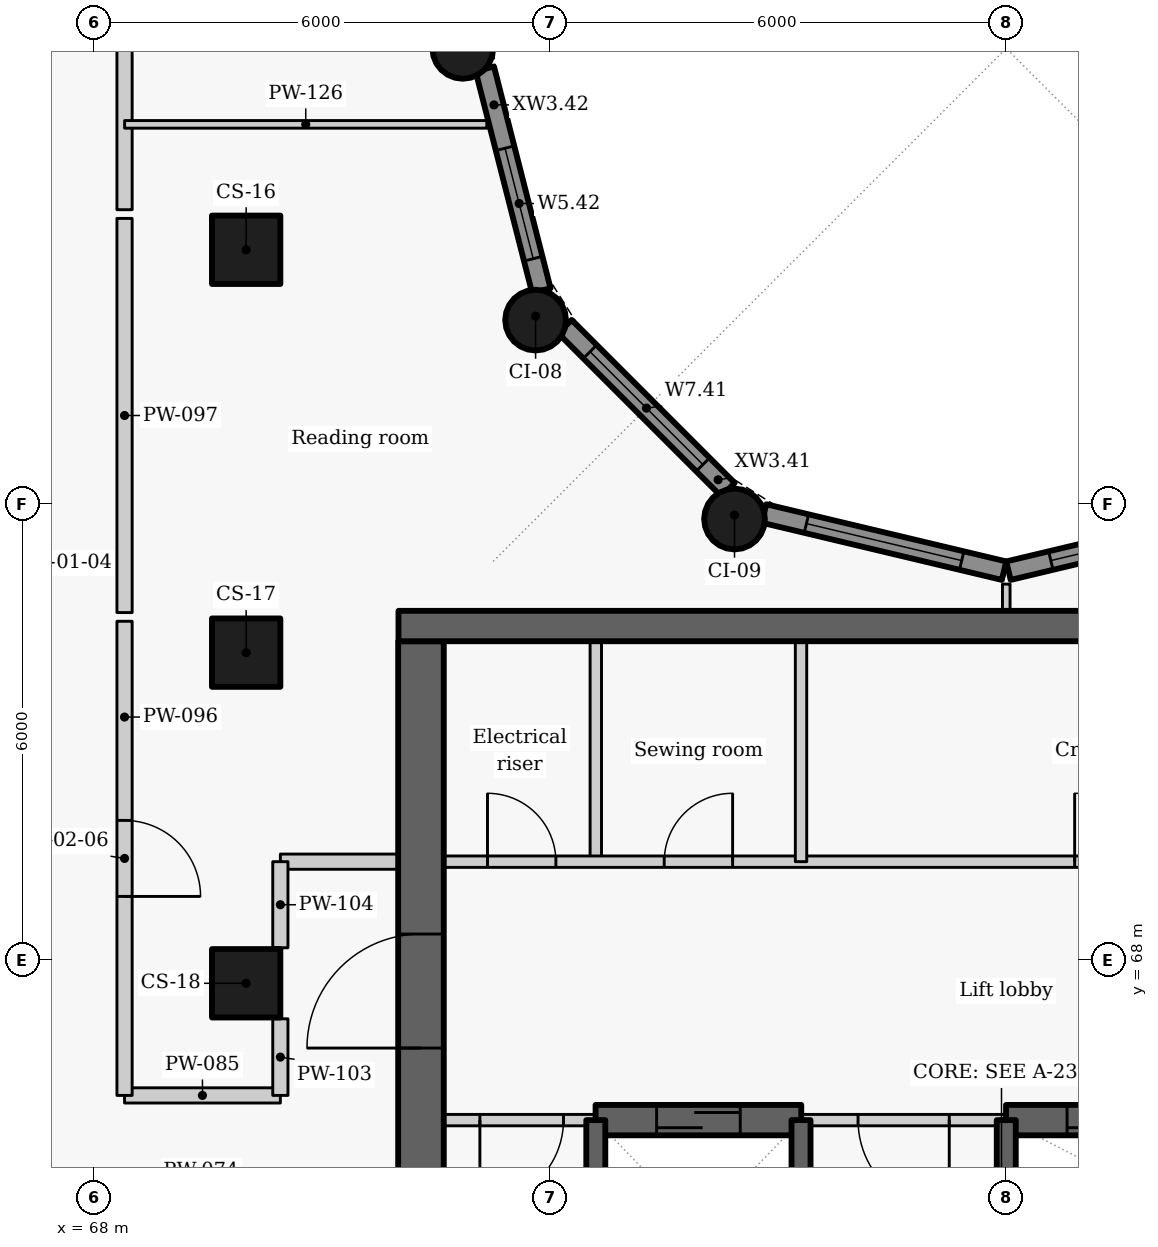
"""IFC4 building model, lengths in metres.
Left out: names, types, materials, properties, quantities, classifications, styles, units other than length and angle.
Written with IfcOpenShell. Run it as: python <this file> out.ifc"""

import sys

from ifc_helpers import new_model, si_unit, direction, frame, frame_2d, origin, origin_2d, place, context, subcontext, project, spatial, rectangle, circle, extrude, element, fill, save


model = new_model("IFC4")
c1 = context("Model", 3, precision=1e-05, world=origin(), true_north=direction((0.0, 1.0)))
c2 = subcontext(c1, "Body", "Model", "MODEL_VIEW")
j1 = project(units=[si_unit("LENGTHUNIT", "METRE"), si_unit("PLANEANGLEUNIT", "RADIAN")], contexts=[c1])
p1 = place(None, origin())
s1 = spatial("IfcSite", under=j1, at=p1, CompositionType="ELEMENT")
p2 = place(p1, origin())
s2 = spatial("IfcBuilding", under=s1, at=p2, CompositionType="ELEMENT")
p3 = place(p2, frame((0.0, 0.0, 183.3)))
s3 = spatial("IfcBuildingStorey", under=s2, at=p3, CompositionType="ELEMENT", Elevation=183.3)
for number, where, z_axis, x_axis in (
    (1, (70.0, 77.35, 0.0), (0.0, 0.0, 1.0), (0.0, -1.0, 0.0)),
    (2, (70.0, 72.05, 0.0), (0.0, 0.0, 1.0), (0.0, -1.0, 0.0)),
    (3, (70.0, 67.7, 0.0), (0.0, 0.0, 1.0), (0.0, -1.0, 0.0)),
):
    element("IfcColumn", number, at=place(p3, frame(where, z_axis=z_axis, x_axis=x_axis)), inside=s3, PredefinedType="COLUMN", context=c2, shape_type="SweptSolid", body=[
        extrude(rectangle(XDim=0.9, YDim=0.9, at=origin_2d()), origin(), (0.0, 0.0, 1.0), 3.3),
    ])
for number, where, z_axis, x_axis in (
    (4, (72.85, 80.0, 0.0), (0.0, 0.0, 1.0), (0.0, -1.0, 0.0)),
    (5, (73.808, 76.425, 0.0), (0.0, 0.0, 1.0), (0.5, -0.866, 0.0)),
    (6, (76.425, 73.808, 0.0), (0.0, 0.0, 1.0), (0.866, -0.5, 0.0)),
):
    element("IfcColumn", number, at=place(p3, frame(where, z_axis=z_axis, x_axis=x_axis)), inside=s3, PredefinedType="COLUMN", context=c2, shape_type="SweptSolid", body=[
        extrude(circle(Radius=0.4, at=origin_2d()), origin(), (0.0, 0.0, 1.0), 3.3),
    ])
p4 = place(p3, frame((83.186, 73.881, 0.0), z_axis=(0.0, 0.0, 1.0), x_axis=(-0.972773113459, -0.231759508395, 0.0)))
e7 = element("IfcWall", 7, at=p4, inside=s3, PredefinedType="SOLIDWALL", context=c2, shape_type="SweptSolid", body=[
    extrude(rectangle(XDim=3.246, YDim=0.25, at=frame_2d((1.623, 0.0))), origin(), (0.0, 0.0, 1.0), 2.425),
])
p5 = place(p4, frame((0.573, 0.0, 0.9)))
e8 = element("IfcOpeningElement", 8, at=p5, cuts=e7, PredefinedType="OPENING", context=c2, shape_type="SweptSolid", body=[
    extrude(rectangle(XDim=2.1, YDim=1.1, at=frame_2d((1.05, 0.55))), frame((0.0, 0.135, 0.0), z_axis=(0.0, -1.0, 0.0), x_axis=(1.0, 0.0, 0.0)), (0.0, 0.0, 1.0), 0.27),
])
p6 = place(p3, frame((79.971, 73.128, 0.0), z_axis=(0.0, 0.0, 1.0), x_axis=(-0.972773113459, 0.231759508395, 0.0)))
e9 = element("IfcWall", 9, at=p6, inside=s3, PredefinedType="SOLIDWALL", context=c2, shape_type="SweptSolid", body=[
    extrude(rectangle(XDim=3.246, YDim=0.25, at=frame_2d((1.623, 0.0))), origin(), (0.0, 0.0, 1.0), 2.425),
])
p7 = place(p6, frame((0.573, 0.0, 0.9)))
e10 = element("IfcOpeningElement", 10, at=p7, cuts=e9, PredefinedType="OPENING", context=c2, shape_type="SweptSolid", body=[
    extrude(rectangle(XDim=2.1, YDim=1.1, at=frame_2d((1.05, 0.55))), frame((0.0, 0.135, 0.0), z_axis=(0.0, -1.0, 0.0), x_axis=(1.0, 0.0, 0.0)), (0.0, 0.0, 1.0), 0.27),
])
p8 = place(p3, frame((76.339, 74.194, 0.0), z_axis=(0.0, 0.0, 1.0), x_axis=(-0.707106781187, 0.707106781187, 0.0)))
e11 = element("IfcWall", 11, at=p8, inside=s3, PredefinedType="SOLIDWALL", context=c2, shape_type="SweptSolid", body=[
    extrude(rectangle(XDim=3.033, YDim=0.25, at=frame_2d((1.517, 0.0))), origin(), (0.0, 0.0, 1.0), 2.425),
])
p9 = place(p8, frame((0.467, 0.0, 0.9)))
e12 = element("IfcOpeningElement", 12, at=p9, cuts=e11, PredefinedType="OPENING", context=c2, shape_type="SweptSolid", body=[
    extrude(rectangle(XDim=2.1, YDim=1.1, at=frame_2d((1.05, 0.55))), frame((0.0, 0.135, 0.0), z_axis=(0.0, -1.0, 0.0), x_axis=(1.0, 0.0, 0.0)), (0.0, 0.0, 1.0), 0.27),
])
p10 = place(p3, frame((73.883, 76.813, 0.0), z_axis=(0.0, 0.0, 1.0), x_axis=(-0.247055971283, 0.969001211069, 0.0)))
e13 = element("IfcWall", 13, at=p10, inside=s3, PredefinedType="SOLIDWALL", context=c2, shape_type="SweptSolid", body=[
    extrude(rectangle(XDim=3.01, YDim=0.25, at=frame_2d((1.505, 0.0))), origin(), (0.0, 0.0, 1.0), 2.425),
])
p11 = place(p10, frame((0.433, 0.0, 0.9)))
e14 = element("IfcOpeningElement", 14, at=p11, cuts=e13, PredefinedType="OPENING", context=c2, shape_type="SweptSolid", body=[
    extrude(rectangle(XDim=1.5, YDim=1.1, at=frame_2d((0.75, 0.55))), frame((0.0, 0.135, 0.0), z_axis=(0.0, -1.0, 0.0), x_axis=(1.0, 0.0, 0.0)), (0.0, 0.0, 1.0), 0.27),
])
p12 = place(p3, frame((74.6, 69.3, 0.0), z_axis=(0.0, 0.0, 1.0), x_axis=(0.0, 1.0, 0.0)))
e15 = element("IfcWall", 15, at=p12, inside=s3, PredefinedType="PARTITIONING", context=c2, shape_type="SweptSolid", body=[
    extrude(rectangle(XDim=2.9, YDim=0.15, at=frame_2d((1.45, 0.0))), origin(), (0.0, 0.0, 1.0), 3.025),
])
p13 = place(p3, frame((72.0, 69.3, 0.0), z_axis=(0.0, 0.0, 1.0), x_axis=(1.0, 0.0, 0.0)))
e16 = element("IfcWall", 16, at=p13, inside=s3, PredefinedType="PARTITIONING", context=c2, shape_type="SweptSolid", body=[
    extrude(rectangle(XDim=13.4, YDim=0.15, at=frame_2d((6.7, 0.0))), origin(), (0.0, 0.0, 1.0), 3.025),
])
p14 = place(p13, frame((1.175, 0.0, 0.0)))
e17 = element("IfcOpeningElement", 17, at=p14, cuts=e16, PredefinedType="OPENING", context=c2, shape_type="SweptSolid", body=[
    extrude(rectangle(XDim=0.9, YDim=2.1, at=frame_2d((0.45, 1.05))), frame((0.0, 0.085, 0.0), z_axis=(0.0, -1.0, 0.0), x_axis=(1.0, 0.0, 0.0)), (0.0, 0.0, 1.0), 0.17),
])
p15 = place(p13, frame((3.5, 0.0, 0.0)))
e18 = element("IfcOpeningElement", 18, at=p15, cuts=e16, PredefinedType="OPENING", context=c2, shape_type="SweptSolid", body=[
    extrude(rectangle(XDim=0.9, YDim=2.1, at=frame_2d((0.45, 1.05))), frame((0.0, 0.085, 0.0), z_axis=(0.0, -1.0, 0.0), x_axis=(1.0, 0.0, 0.0)), (0.0, 0.0, 1.0), 0.17),
])
p16 = place(p13, frame((8.9, 0.0, 0.0)))
e19 = element("IfcOpeningElement", 19, at=p16, cuts=e16, PredefinedType="OPENING", context=c2, shape_type="SweptSolid", body=[
    extrude(rectangle(XDim=0.9, YDim=2.1, at=frame_2d((0.45, 1.05))), frame((0.0, 0.085, 0.0), z_axis=(0.0, -1.0, 0.0), x_axis=(1.0, 0.0, 0.0)), (0.0, 0.0, 1.0), 0.17),
])
p17 = place(p3, frame((72.3, 63.1, -0.275), z_axis=(0.0, 0.0, 1.0), x_axis=(0.0, 1.0, 0.0)))
e20 = element("IfcWall", 20, at=p17, inside=s3, PredefinedType="SHEAR", context=c2, shape_type="SweptSolid", body=[
    extrude(rectangle(XDim=9.1, YDim=0.6, at=frame_2d((4.55, 0.0))), origin(), (0.0, 0.0, 1.0), 3.3),
])
p18 = place(p17, frame((3.748, 0.0, 0.275)))
e21 = element("IfcOpeningElement", 21, at=p18, cuts=e20, PredefinedType="OPENING", context=c2, shape_type="SweptSolid", body=[
    extrude(rectangle(XDim=1.5, YDim=2.1, at=frame_2d((0.75, 1.05))), frame((0.0, 0.31, 0.0), z_axis=(0.0, -1.0, 0.0), x_axis=(1.0, 0.0, 0.0)), (0.0, 0.0, 1.0), 0.62),
])
p19 = place(p3, frame((77.3, 69.3, 0.0), z_axis=(0.0, 0.0, 1.0), x_axis=(0.0, 1.0, 0.0)))
e22 = element("IfcWall", 22, at=p19, inside=s3, PredefinedType="PARTITIONING", context=c2, shape_type="SweptSolid", body=[
    extrude(rectangle(XDim=2.9, YDim=0.15, at=frame_2d((1.45, 0.0))), origin(), (0.0, 0.0, 1.0), 3.025),
])
p20 = place(p3, frame((74.603, 65.9, 0.0), z_axis=(0.0, 0.0, 1.0), x_axis=(-1.0, 0.0, 0.0)))
e23 = element("IfcWall", 23, at=p20, inside=s3, PredefinedType="PARTITIONING", context=c2, shape_type="SweptSolid", body=[
    extrude(rectangle(XDim=2.603, YDim=0.15, at=frame_2d((1.302, 0.0))), origin(), (0.0, 0.0, 1.0), 3.025),
])
p21 = place(p20, frame((0.428, 0.0, 0.0)))
e24 = element("IfcOpeningElement", 24, at=p21, cuts=e23, PredefinedType="OPENING", context=c2, shape_type="SweptSolid", body=[
    extrude(rectangle(XDim=1.1, YDim=2.1, at=frame_2d((0.55, 1.05))), frame((0.0, 0.085, 0.0), z_axis=(0.0, -1.0, 0.0), x_axis=(1.0, 0.0, 0.0)), (0.0, 0.0, 1.0), 0.17),
])
p22 = place(p3, frame((80.003, 65.9, 0.0), z_axis=(0.0, 0.0, 1.0), x_axis=(-1.0, 0.0, 0.0)))
e25 = element("IfcWall", 25, at=p22, inside=s3, PredefinedType="PARTITIONING", context=c2, shape_type="SweptSolid", body=[
    extrude(rectangle(XDim=2.706, YDim=0.15, at=frame_2d((1.353, 0.0))), origin(), (0.0, 0.0, 1.0), 3.025),
])
p23 = place(p22, frame((0.753, 0.0, 0.0)))
e26 = element("IfcOpeningElement", 26, at=p23, cuts=e25, PredefinedType="OPENING", context=c2, shape_type="SweptSolid", body=[
    extrude(rectangle(XDim=1.2, YDim=2.1, at=frame_2d((0.6, 1.05))), frame((0.0, 0.085, 0.0), z_axis=(0.0, -1.0, 0.0), x_axis=(1.0, 0.0, 0.0)), (0.0, 0.0, 1.0), 0.17),
])
p24 = place(p3, frame((74.597, 65.9, -0.275), z_axis=(0.0, 0.0, 1.0), x_axis=(1.0, 0.0, 0.0)))
e27 = element("IfcWall", 27, at=p24, inside=s3, PredefinedType="SHEAR", context=c2, shape_type="SweptSolid", body=[
    extrude(rectangle(XDim=2.706, YDim=0.4, at=frame_2d((1.353, 0.0))), origin(), (0.0, 0.0, 1.0), 3.3),
])
p25 = place(p24, frame((0.803, 0.0, 0.275)))
e28 = element("IfcOpeningElement", 28, at=p25, cuts=e27, PredefinedType="OPENING", context=c2, shape_type="SweptSolid", body=[
    extrude(rectangle(XDim=1.1, YDim=2.1, at=frame_2d((0.55, 1.05))), frame((0.0, 0.21, 0.0), z_axis=(0.0, -1.0, 0.0), x_axis=(1.0, 0.0, 0.0)), (0.0, 0.0, 1.0), 0.42),
])
p26 = place(p3, frame((79.997, 65.9, -0.275), z_axis=(0.0, 0.0, 1.0), x_axis=(1.0, 0.0, 0.0)))
e29 = element("IfcWall", 29, at=p26, inside=s3, PredefinedType="SHEAR", context=c2, shape_type="SweptSolid", body=[
    extrude(rectangle(XDim=5.406, YDim=0.4, at=frame_2d((2.703, 0.0))), origin(), (0.0, 0.0, 1.0), 3.3),
])
p27 = place(p26, frame((0.803, 0.0, 0.275)))
e30 = element("IfcOpeningElement", 30, at=p27, cuts=e29, PredefinedType="OPENING", context=c2, shape_type="SweptSolid", body=[
    extrude(rectangle(XDim=1.1, YDim=2.1, at=frame_2d((0.55, 1.05))), frame((0.0, 0.21, 0.0), z_axis=(0.0, -1.0, 0.0), x_axis=(1.0, 0.0, 0.0)), (0.0, 0.0, 1.0), 0.42),
])
for number, where, z_axis, x_axis in (
    (31, (74.6, 63.1, -0.275), (0.0, 0.0, 1.0), (0.0, 1.0, 0.0)),
    (32, (77.3, 63.1, -0.275), (0.0, 0.0, 1.0), (0.0, 1.0, 0.0)),
    (33, (80.0, 63.1, -0.275), (0.0, 0.0, 1.0), (0.0, 1.0, 0.0)),
):
    element("IfcWall", number, at=place(p3, frame(where, z_axis=z_axis, x_axis=x_axis)), inside=s3, PredefinedType="SHEAR", context=c2, shape_type="SweptSolid", body=[
        extrude(rectangle(XDim=2.8, YDim=0.25, at=frame_2d((1.4, 0.0))), origin(), (0.0, 0.0, 1.0), 3.3),
    ])
p28 = place(p3, frame((70.45, 69.3, 0.0), z_axis=(0.0, 0.0, 1.0), x_axis=(1.0, 0.0, 0.0)))
e34 = element("IfcWall", 34, at=p28, inside=s3, PredefinedType="PARTITIONING", context=c2, shape_type="SweptSolid", body=[
    extrude(rectangle(XDim=1.55, YDim=0.2, at=frame_2d((0.775, 0.0))), origin(), (0.0, 0.0, 1.0), 3.025),
])
p29 = place(p3, frame((68.4, 66.225, 0.0), z_axis=(0.0, 0.0, 1.0), x_axis=(1.0, 0.0, 0.0)))
e35 = element("IfcWall", 35, at=p29, inside=s3, PredefinedType="PARTITIONING", context=c2, shape_type="SweptSolid", body=[
    extrude(rectangle(XDim=2.05, YDim=0.2, at=frame_2d((1.025, 0.0))), origin(), (0.0, 0.0, 1.0), 2.505),
])
p30 = place(p3, frame((68.4, 72.463, 0.0), z_axis=(0.0, 0.0, 1.0), x_axis=(0.0, -1.0, 0.0)))
e36 = element("IfcWall", 36, at=p30, inside=s3, PredefinedType="PARTITIONING", context=c2, shape_type="SweptSolid", body=[
    extrude(rectangle(XDim=6.238, YDim=0.2, at=frame_2d((3.119, 0.0))), origin(), (0.0, 0.0, 1.0), 3.025),
])
p31 = place(p30, frame((2.62, 0.0, 0.0)))
e37 = element("IfcOpeningElement", 37, at=p31, cuts=e36, PredefinedType="OPENING", context=c2, shape_type="SweptSolid", body=[
    extrude(rectangle(XDim=1.0, YDim=2.1, at=frame_2d((0.5, 1.05))), frame((0.0, 0.11, 0.0), z_axis=(0.0, -1.0, 0.0), x_axis=(1.0, 0.0, 0.0)), (0.0, 0.0, 1.0), 0.22),
])
for number, where, z_axis, x_axis in (
    (38, (68.4, 72.577, 0.0), (0.0, 0.0, 1.0), (0.0, 1.0, 0.0)),
    (39, (68.4, 77.877, 0.0), (0.0, 0.0, 1.0), (0.0, 1.0, 0.0)),
):
    element("IfcWall", number, at=place(p3, frame(where, z_axis=z_axis, x_axis=x_axis)), inside=s3, PredefinedType="PARTITIONING", context=c2, shape_type="SweptSolid", body=[
        extrude(rectangle(XDim=5.186, YDim=0.2, at=frame_2d((2.593, 0.0))), origin(), (0.0, 0.0, 1.0), 3.025),
    ])
p32 = place(p3, frame((70.45, 66.225, 0.0), z_axis=(0.0, 0.0, 1.0), x_axis=(0.0, 1.0, 0.0)))
e40 = element("IfcWall", 40, at=p32, inside=s3, PredefinedType="PARTITIONING", context=c2, shape_type="SweptSolid", body=[
    extrude(rectangle(XDim=1.008, YDim=0.2, at=frame_2d((0.504, 0.0))), origin(), (0.0, 0.0, 1.0), 3.025),
])
p33 = place(p3, frame((70.45, 68.167, 0.0), z_axis=(0.0, 0.0, 1.0), x_axis=(0.0, 1.0, 0.0)))
e41 = element("IfcWall", 41, at=p33, inside=s3, PredefinedType="PARTITIONING", context=c2, shape_type="SweptSolid", body=[
    extrude(rectangle(XDim=1.133, YDim=0.2, at=frame_2d((0.566, 0.0))), origin(), (0.0, 0.0, 1.0), 3.025),
])
p34 = place(p3, frame((80.0, 72.6, 0.0), z_axis=(0.0, 0.0, 1.0), x_axis=(0.0, 1.0, 0.0)))
e42 = element("IfcWall", 42, at=p34, inside=s3, PredefinedType="PARTITIONING", context=c2, shape_type="SweptSolid", body=[
    extrude(rectangle(XDim=0.352, YDim=0.1, at=frame_2d((0.176, 0.0))), origin(), (0.0, 0.0, 1.0), 3.025),
])
p35 = place(p3, frame((68.401, 79.0, 0.0), z_axis=(0.0, 0.0, 1.0), x_axis=(1.0, 0.0, 0.0)))
e43 = element("IfcWall", 43, at=p35, inside=s3, PredefinedType="PARTITIONING", context=c2, shape_type="SweptSolid", body=[
    extrude(rectangle(XDim=4.766, YDim=0.1, at=frame_2d((2.383, 0.0))), origin(), (0.0, 0.0, 1.0), 2.505),
])
p36 = place(p3, frame((72.004, 72.4, -0.275), z_axis=(0.0, 0.0, 1.0), x_axis=(1.0, 0.0, 0.0)))
e44 = element("IfcWall", 44, at=p36, inside=s3, PredefinedType="SHEAR", context=c2, shape_type="SweptSolid", body=[
    extrude(rectangle(XDim=15.992, YDim=0.4, at=frame_2d((7.996, 0.0))), origin(), (0.0, 0.0, 1.0), 3.3),
])
p37 = place(p5, origin())
e45 = element("IfcWindow", 45, at=p37, inside=s3, PartitioningType="SINGLE_PANEL", PredefinedType="WINDOW", context=c2, shape_type="SweptSolid", body=[
    extrude(rectangle(XDim=2.1, YDim=1.1, at=frame_2d((1.05, 0.55))), frame((0.0, 0.03, 0.0), z_axis=(0.0, -1.0, 0.0), x_axis=(1.0, 0.0, 0.0)), (0.0, 0.0, 1.0), 0.06),
])
fill(e8, e45)
p38 = place(p7, origin())
e46 = element("IfcWindow", 46, at=p38, inside=s3, PartitioningType="SINGLE_PANEL", PredefinedType="WINDOW", context=c2, shape_type="SweptSolid", body=[
    extrude(rectangle(XDim=2.1, YDim=1.1, at=frame_2d((1.05, 0.55))), frame((0.0, 0.03, 0.0), z_axis=(0.0, -1.0, 0.0), x_axis=(1.0, 0.0, 0.0)), (0.0, 0.0, 1.0), 0.06),
])
fill(e10, e46)
p39 = place(p9, origin())
e47 = element("IfcWindow", 47, at=p39, inside=s3, PartitioningType="SINGLE_PANEL", PredefinedType="WINDOW", context=c2, shape_type="SweptSolid", body=[
    extrude(rectangle(XDim=2.1, YDim=1.1, at=frame_2d((1.05, 0.55))), frame((0.0, 0.03, 0.0), z_axis=(0.0, -1.0, 0.0), x_axis=(1.0, 0.0, 0.0)), (0.0, 0.0, 1.0), 0.06),
])
fill(e12, e47)
p40 = place(p11, origin())
e48 = element("IfcWindow", 48, at=p40, inside=s3, PartitioningType="SINGLE_PANEL", PredefinedType="WINDOW", context=c2, shape_type="SweptSolid", body=[
    extrude(rectangle(XDim=1.5, YDim=1.1, at=frame_2d((0.75, 0.55))), frame((0.0, 0.03, 0.0), z_axis=(0.0, -1.0, 0.0), x_axis=(1.0, 0.0, 0.0)), (0.0, 0.0, 1.0), 0.06),
])
fill(e14, e48)
p41 = place(p14, origin())
e49 = element("IfcDoor", 49, at=p41, inside=s3, OperationType="SINGLE_SWING_LEFT", PredefinedType="DOOR", context=c2, shape_type="SweptSolid", body=[
    extrude(rectangle(XDim=0.9, YDim=2.1, at=frame_2d((0.45, 1.05))), frame((0.0, 0.025, 0.0), z_axis=(0.0, -1.0, 0.0), x_axis=(1.0, 0.0, 0.0)), (0.0, 0.0, 1.0), 0.05),
])
fill(e17, e49)
p42 = place(p15, origin())
e50 = element("IfcDoor", 50, at=p42, inside=s3, OperationType="SINGLE_SWING_RIGHT", PredefinedType="DOOR", context=c2, shape_type="SweptSolid", body=[
    extrude(rectangle(XDim=0.9, YDim=2.1, at=frame_2d((0.45, 1.05))), frame((0.0, 0.025, 0.0), z_axis=(0.0, -1.0, 0.0), x_axis=(1.0, 0.0, 0.0)), (0.0, 0.0, 1.0), 0.05),
])
fill(e18, e50)
p43 = place(p16, origin())
e51 = element("IfcDoor", 51, at=p43, inside=s3, OperationType="SINGLE_SWING_LEFT", PredefinedType="DOOR", context=c2, shape_type="SweptSolid", body=[
    extrude(rectangle(XDim=0.9, YDim=2.1, at=frame_2d((0.45, 1.05))), frame((0.0, 0.025, 0.0), z_axis=(0.0, -1.0, 0.0), x_axis=(1.0, 0.0, 0.0)), (0.0, 0.0, 1.0), 0.05),
])
fill(e19, e51)
p44 = place(p21, origin())
e52 = element("IfcDoor", 52, at=p44, inside=s3, OperationType="SINGLE_SWING_RIGHT", PredefinedType="DOOR", context=c2, shape_type="SweptSolid", body=[
    extrude(rectangle(XDim=1.1, YDim=2.1, at=frame_2d((0.55, 1.05))), frame((0.0, 0.025, 0.0), z_axis=(0.0, -1.0, 0.0), x_axis=(1.0, 0.0, 0.0)), (0.0, 0.0, 1.0), 0.05),
])
fill(e24, e52)
p45 = place(p25, origin())
e53 = element("IfcDoor", 53, at=p45, inside=s3, OperationType="SLIDING_TO_LEFT", PredefinedType="DOOR", context=c2, shape_type="SweptSolid", body=[
    extrude(rectangle(XDim=1.1, YDim=2.1, at=frame_2d((0.55, 1.05))), frame((0.0, 0.025, 0.0), z_axis=(0.0, -1.0, 0.0), x_axis=(1.0, 0.0, 0.0)), (0.0, 0.0, 1.0), 0.05),
])
fill(e28, e53)
p46 = place(p23, origin())
e54 = element("IfcDoor", 54, at=p46, inside=s3, OperationType="DOUBLE_DOOR_SINGLE_SWING", PredefinedType="DOOR", context=c2, shape_type="SweptSolid", body=[
    extrude(rectangle(XDim=1.2, YDim=2.1, at=frame_2d((0.6, 1.05))), frame((0.0, 0.025, 0.0), z_axis=(0.0, -1.0, 0.0), x_axis=(1.0, 0.0, 0.0)), (0.0, 0.0, 1.0), 0.05),
])
fill(e26, e54)
p47 = place(p27, origin())
e55 = element("IfcDoor", 55, at=p47, inside=s3, OperationType="SLIDING_TO_LEFT", PredefinedType="DOOR", context=c2, shape_type="SweptSolid", body=[
    extrude(rectangle(XDim=1.1, YDim=2.1, at=frame_2d((0.55, 1.05))), frame((0.0, 0.025, 0.0), z_axis=(0.0, -1.0, 0.0), x_axis=(1.0, 0.0, 0.0)), (0.0, 0.0, 1.0), 0.05),
])
fill(e30, e55)
p48 = place(p31, origin())
e56 = element("IfcDoor", 56, at=p48, inside=s3, OperationType="SINGLE_SWING_RIGHT", PredefinedType="DOOR", context=c2, shape_type="SweptSolid", body=[
    extrude(rectangle(XDim=1.0, YDim=2.1, at=frame_2d((0.5, 1.05))), frame((0.0, 0.025, 0.0), z_axis=(0.0, -1.0, 0.0), x_axis=(1.0, 0.0, 0.0)), (0.0, 0.0, 1.0), 0.05),
])
fill(e37, e56)
p49 = place(p18, origin())
e57 = element("IfcDoor", 57, at=p49, inside=s3, OperationType="DOUBLE_DOOR_SINGLE_SWING", PredefinedType="DOOR", context=c2, shape_type="SweptSolid", body=[
    extrude(rectangle(XDim=1.5, YDim=2.1, at=frame_2d((0.75, 1.05))), frame((0.0, 0.025, 0.0), z_axis=(0.0, -1.0, 0.0), x_axis=(1.0, 0.0, 0.0)), (0.0, 0.0, 1.0), 0.05),
])
fill(e21, e57)
save(model, sys.argv[1])
